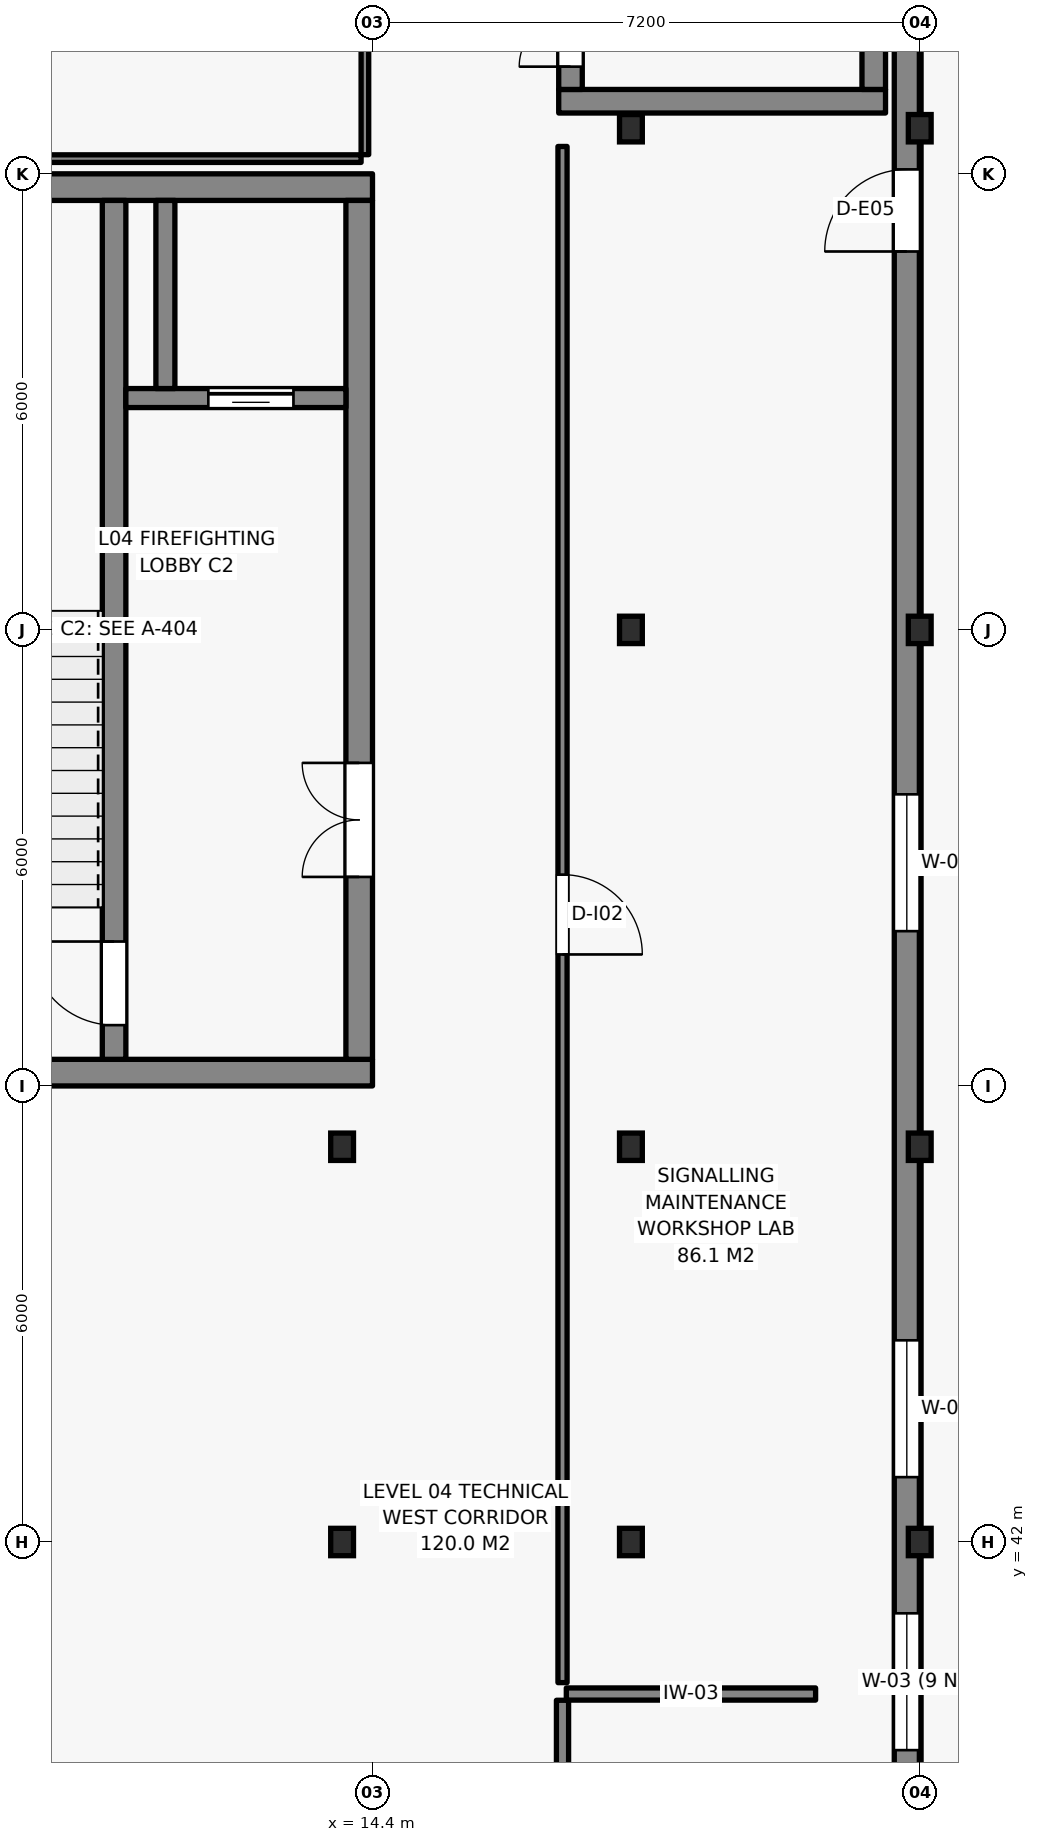
"""IFC4 building model, lengths in metres.
Left out: names, types, materials, properties, quantities, classifications, styles, units other than length and angle.
Written with IfcOpenShell. Run it as: python <this file> out.ifc"""

import sys

from ifc_helpers import new_model, si_unit, direction, frame, frame_2d, origin, origin_2d, place, context, subcontext, project, spatial, rectangle, i_section, extrude, element, fill, save


model = new_model("IFC4")
c1 = context("Model", 3, precision=1e-05, world=origin(), true_north=direction((0.0, 1.0)))
c2 = subcontext(c1, "Body", "Model", "MODEL_VIEW")
j1 = project(units=[si_unit("LENGTHUNIT", "METRE"), si_unit("PLANEANGLEUNIT", "RADIAN")], contexts=[c1])
p1 = place(None, origin())
s1 = spatial("IfcSite", under=j1, at=p1, CompositionType="ELEMENT")
p2 = place(p1, origin())
s2 = spatial("IfcBuilding", under=s1, at=p2, CompositionType="ELEMENT")
p3 = place(p2, frame((0.0, 0.0, 14.7)))
s3 = spatial("IfcBuildingStorey", under=s2, at=p3, CompositionType="ELEMENT", Elevation=14.7)
for number, where, z_axis, x_axis in (
    (1, (7.2, 48.175, 0.0), (0.0, 0.0, 1.0), (1.0, 0.0, 0.0)),
    (2, (7.2, 59.825, 0.0), (0.0, 0.0, 1.0), (1.0, 0.0, 0.0)),
):
    element("IfcWall", number, at=place(p3, frame(where, z_axis=z_axis, x_axis=x_axis)), inside=s3, PredefinedType="SHEAR", context=c2, shape_type="SweptSolid", body=[
        extrude(rectangle(XDim=7.2, YDim=0.35, at=frame_2d((3.6, 0.0))), origin(), (0.0, 0.0, 1.0), 3.8),
    ])
p4 = place(p3, frame((14.225, 48.35, 0.0), z_axis=(0.0, 0.0, 1.0), x_axis=(0.0, 1.0, 0.0)))
e3 = element("IfcWall", 3, at=p4, inside=s3, PredefinedType="SHEAR", context=c2, shape_type="SweptSolid", body=[
    extrude(rectangle(XDim=11.3, YDim=0.35, at=frame_2d((5.65, 0.0))), origin(), (0.0, 0.0, 1.0), 3.8),
])
p5 = place(p4, frame((2.4, 0.0, 0.0)))
e4 = element("IfcOpeningElement", 4, at=p5, cuts=e3, PredefinedType="OPENING", context=c2, shape_type="SweptSolid", body=[
    extrude(rectangle(XDim=1.5, YDim=2.15, at=frame_2d((0.75, 1.075))), frame((0.0, 0.185, 0.0), z_axis=(0.0, -1.0, 0.0), x_axis=(1.0, 0.0, 0.0)), (0.0, 0.0, 1.0), 0.37),
])
p6 = place(p3, frame((11.0, 48.35, 0.0), z_axis=(0.0, 0.0, 1.0), x_axis=(0.0, 1.0, 0.0)))
e5 = element("IfcWall", 5, at=p6, inside=s3, PredefinedType="SHEAR", context=c2, shape_type="SweptSolid", body=[
    extrude(rectangle(XDim=11.3, YDim=0.31, at=frame_2d((5.65, 0.0))), origin(), (0.0, 0.0, 1.0), 3.8),
])
p7 = place(p6, frame((0.45, 0.0, 0.0)))
e6 = element("IfcOpeningElement", 6, at=p7, cuts=e5, PredefinedType="OPENING", context=c2, shape_type="SweptSolid", body=[
    extrude(rectangle(XDim=1.1, YDim=2.15, at=frame_2d((0.55, 1.075))), frame((0.0, 0.165, 0.0), z_axis=(0.0, -1.0, 0.0), x_axis=(1.0, 0.0, 0.0)), (0.0, 0.0, 1.0), 0.33),
])
p8 = place(p3, frame((16.85, 60.955, 0.0), z_axis=(0.0, 0.0, 1.0), x_axis=(1.0, 0.0, 0.0)))
e7 = element("IfcWall", 7, at=p8, inside=s3, PredefinedType="SHEAR", context=c2, shape_type="SweptSolid", body=[
    extrude(rectangle(XDim=4.3, YDim=0.31, at=frame_2d((2.15, 0.0))), origin(), (0.0, 0.0, 1.0), 3.8),
])
p9 = place(p3, frame((17.005, 61.11, 0.0), z_axis=(0.0, 0.0, 1.0), x_axis=(0.0, 1.0, 0.0)))
e8 = element("IfcWall", 8, at=p9, inside=s3, PredefinedType="SHEAR", context=c2, shape_type="SweptSolid", body=[
    extrude(rectangle(XDim=9.58, YDim=0.31, at=frame_2d((4.79, 0.0))), origin(), (0.0, 0.0, 1.0), 3.8),
])
p10 = place(p9, frame((0.3, 0.0, 0.0)))
e9 = element("IfcOpeningElement", 9, at=p10, cuts=e8, PredefinedType="OPENING", context=c2, shape_type="SweptSolid", body=[
    extrude(rectangle(XDim=1.35, YDim=2.15, at=frame_2d((0.675, 1.075))), frame((0.0, 0.165, 0.0), z_axis=(0.0, -1.0, 0.0), x_axis=(1.0, 0.0, 0.0)), (0.0, 0.0, 1.0), 0.33),
])
p11 = place(p3, frame((20.995, 61.11, 0.0), z_axis=(0.0, 0.0, 1.0), x_axis=(0.0, 1.0, 0.0)))
e10 = element("IfcWall", 10, at=p11, inside=s3, PredefinedType="SHEAR", context=c2, shape_type="SweptSolid", body=[
    extrude(rectangle(XDim=9.58, YDim=0.31, at=frame_2d((4.79, 0.0))), origin(), (0.0, 0.0, 1.0), 3.8),
])
for number, where, z_axis, x_axis in (
    (11, (14.0, 42.0, 0.0), (0.0, 0.0, 1.0), (1.0, 0.0, 0.0)),
    (12, (14.0, 47.2, 0.0), (0.0, 0.0, 1.0), (1.0, 0.0, 0.0)),
    (13, (17.8, 42.0, 0.0), (0.0, 0.0, 1.0), (1.0, 0.0, 0.0)),
    (14, (17.8, 47.2, 0.0), (0.0, 0.0, 1.0), (1.0, 0.0, 0.0)),
    (15, (17.8, 54.0, 0.0), (0.0, 0.0, 1.0), (1.0, 0.0, 0.0)),
    (16, (17.8, 60.6, 0.0), (0.0, 0.0, 1.0), (1.0, 0.0, 0.0)),
    (17, (21.6, 42.0, 0.0), (0.0, 0.0, 1.0), (1.0, 0.0, 0.0)),
    (18, (21.6, 47.2, 0.0), (0.0, 0.0, 1.0), (1.0, 0.0, 0.0)),
    (19, (21.6, 54.0, 0.0), (0.0, 0.0, 1.0), (1.0, 0.0, 0.0)),
    (20, (21.6, 60.6, 0.0), (0.0, 0.0, 1.0), (1.0, 0.0, 0.0)),
):
    element("IfcColumn", number, at=place(p3, frame(where, z_axis=z_axis, x_axis=x_axis)), inside=s3, PredefinedType="COLUMN", context=c2, shape_type="SweptSolid", body=[
        extrude(i_section(OverallWidth=0.3, OverallDepth=0.36, WebThickness=0.012, FlangeThickness=0.022, FilletRadius=0.027, at=origin_2d()), origin(), (0.0, 0.0, 1.0), 4.05),
    ])
p12 = place(p3, frame((21.43, 24.0, 0.0), z_axis=(0.0, 0.0, 1.0), x_axis=(0.0, 1.0, 0.0)))
e21 = element("IfcWall", 21, at=p12, inside=s3, PredefinedType="SOLIDWALL", context=c2, shape_type="SweptSolid", body=[
    extrude(rectangle(XDim=46.69, YDim=0.33, at=frame_2d((23.345, 0.0))), origin(), (0.0, 0.0, 1.0), 3.415),
])
p13 = place(p12, frame((9.381, 0.0, 0.0)))
e22 = element("IfcOpeningElement", 22, at=p13, cuts=e21, PredefinedType="OPENING", context=c2, shape_type="SweptSolid", body=[
    extrude(rectangle(XDim=1.85, YDim=2.25, at=frame_2d((0.925, 1.125))), frame((0.0, 0.175, 0.0), z_axis=(0.0, -1.0, 0.0), x_axis=(1.0, 0.0, 0.0)), (0.0, 0.0, 1.0), 0.35),
])
p14 = place(p12, frame((34.978, 0.0, 0.0)))
e23 = element("IfcOpeningElement", 23, at=p14, cuts=e21, PredefinedType="OPENING", context=c2, shape_type="SweptSolid", body=[
    extrude(rectangle(XDim=1.08, YDim=2.2, at=frame_2d((0.54, 1.1))), frame((0.0, 0.175, 0.0), z_axis=(0.0, -1.0, 0.0), x_axis=(1.0, 0.0, 0.0)), (0.0, 0.0, 1.0), 0.35),
])
p15 = place(p12, frame((15.262, 0.0, 0.82)))
e24 = element("IfcOpeningElement", 24, at=p15, cuts=e21, PredefinedType="OPENING", context=c2, shape_type="SweptSolid", body=[
    extrude(rectangle(XDim=1.8, YDim=2.35, at=frame_2d((0.9, 1.175))), frame((0.0, 0.175, 0.0), z_axis=(0.0, -1.0, 0.0), x_axis=(1.0, 0.0, 0.0)), (0.0, 0.0, 1.0), 0.35),
])
p16 = place(p12, frame((18.854, 0.0, 0.82)))
e25 = element("IfcOpeningElement", 25, at=p16, cuts=e21, PredefinedType="OPENING", context=c2, shape_type="SweptSolid", body=[
    extrude(rectangle(XDim=1.8, YDim=2.35, at=frame_2d((0.9, 1.175))), frame((0.0, 0.175, 0.0), z_axis=(0.0, -1.0, 0.0), x_axis=(1.0, 0.0, 0.0)), (0.0, 0.0, 1.0), 0.35),
])
p17 = place(p12, frame((26.037, 0.0, 0.82)))
e26 = element("IfcOpeningElement", 26, at=p17, cuts=e21, PredefinedType="OPENING", context=c2, shape_type="SweptSolid", body=[
    extrude(rectangle(XDim=1.8, YDim=2.35, at=frame_2d((0.9, 1.175))), frame((0.0, 0.175, 0.0), z_axis=(0.0, -1.0, 0.0), x_axis=(1.0, 0.0, 0.0)), (0.0, 0.0, 1.0), 0.35),
])
p18 = place(p12, frame((43.994, 0.0, 0.82)))
e27 = element("IfcOpeningElement", 27, at=p18, cuts=e21, PredefinedType="OPENING", context=c2, shape_type="SweptSolid", body=[
    extrude(rectangle(XDim=1.8, YDim=2.35, at=frame_2d((0.9, 1.175))), frame((0.0, 0.175, 0.0), z_axis=(0.0, -1.0, 0.0), x_axis=(1.0, 0.0, 0.0)), (0.0, 0.0, 1.0), 0.35),
])
p19 = place(p3, frame((11.155, 57.05, 0.0), z_axis=(0.0, 0.0, 1.0), x_axis=(1.0, 0.0, 0.0)))
e28 = element("IfcWall", 28, at=p19, inside=s3, PredefinedType="SHEAR", context=c2, shape_type="SweptSolid", body=[
    extrude(rectangle(XDim=2.895, YDim=0.25, at=frame_2d((1.448, 0.0))), origin(), (0.0, 0.0, 1.0), 3.8),
])
p20 = place(p19, frame((1.085, 0.0, 0.0)))
e29 = element("IfcOpeningElement", 29, at=p20, cuts=e28, PredefinedType="OPENING", context=c2, shape_type="SweptSolid", body=[
    extrude(rectangle(XDim=1.12, YDim=2.15, at=frame_2d((0.56, 1.075))), frame((0.0, 0.135, 0.0), z_axis=(0.0, -1.0, 0.0), x_axis=(1.0, 0.0, 0.0)), (0.0, 0.0, 1.0), 0.27),
])
p21 = place(p3, frame((11.675, 57.175, 0.0), z_axis=(0.0, 0.0, 1.0), x_axis=(0.0, 1.0, 0.0)))
e30 = element("IfcWall", 30, at=p21, inside=s3, PredefinedType="SHEAR", context=c2, shape_type="SweptSolid", body=[
    extrude(rectangle(XDim=2.475, YDim=0.25, at=frame_2d((1.237, 0.0))), origin(), (0.0, 0.0, 1.0), 3.8),
])
p22 = place(p3, frame((20.23, 40.0, 0.0), z_axis=(0.0, 0.0, 1.0), x_axis=(-1.0, 0.0, 0.0)))
e31 = element("IfcWall", 31, at=p22, inside=s3, PredefinedType="PARTITIONING", context=c2, shape_type="SweptSolid", body=[
    extrude(rectangle(XDim=3.28, YDim=0.16, at=frame_2d((1.64, 0.0))), origin(), (0.0, 0.0, 1.0), 3.435),
])
p23 = place(p3, frame((16.9, 39.918, 0.0), z_axis=(0.0, 0.0, 1.0), x_axis=(0.0, -1.0, 0.0)))
e32 = element("IfcWall", 32, at=p23, inside=s3, PredefinedType="PARTITIONING", context=c2, shape_type="SweptSolid", body=[
    extrude(rectangle(XDim=19.186, YDim=0.16, at=frame_2d((9.593, 0.0))), origin(), (0.0, 0.0, 1.0), 3.575),
])
p24 = place(p3, frame((16.9, 60.36, 0.0), z_axis=(0.0, 0.0, 1.0), x_axis=(0.0, -1.0, 0.0)))
e33 = element("IfcWall", 33, at=p24, inside=s3, PredefinedType="PARTITIONING", context=c2, shape_type="SweptSolid", body=[
    extrude(rectangle(XDim=20.21, YDim=0.12, at=frame_2d((10.105, 0.0))), origin(), (0.0, 0.0, 1.0), 3.575),
])
p25 = place(p24, frame((9.58, 0.0, 0.0)))
e34 = element("IfcOpeningElement", 34, at=p25, cuts=e33, PredefinedType="OPENING", context=c2, shape_type="SweptSolid", body=[
    extrude(rectangle(XDim=1.05, YDim=2.15, at=frame_2d((0.525, 1.075))), frame((0.0, 0.07, 0.0), z_axis=(0.0, -1.0, 0.0), x_axis=(1.0, 0.0, 0.0)), (0.0, 0.0, 1.0), 0.14),
])
p26 = place(p3, frame((5.01, 60.2, 0.0), z_axis=(0.0, 0.0, 1.0), x_axis=(1.0, 0.0, 0.0)))
e35 = element("IfcWall", 35, at=p26, inside=s3, PredefinedType="MOVABLE", context=c2, shape_type="SweptSolid", body=[
    extrude(rectangle(XDim=9.24, YDim=0.1, at=frame_2d((4.62, 0.0))), origin(), (0.0, 0.0, 1.0), 3.415),
])
p27 = place(p3, frame((14.3, 60.252, 0.0), z_axis=(0.0, 0.0, 1.0), x_axis=(0.0, 1.0, 0.0)))
e36 = element("IfcWall", 36, at=p27, inside=s3, PredefinedType="MOVABLE", context=c2, shape_type="SweptSolid", body=[
    extrude(rectangle(XDim=10.798, YDim=0.1, at=frame_2d((5.399, 0.0))), origin(), (0.0, 0.0, 1.0), 3.76),
])
p28 = place(p27, frame((4.699, 0.0, 0.0)))
e37 = element("IfcOpeningElement", 37, at=p28, cuts=e36, PredefinedType="OPENING", context=c2, shape_type="SweptSolid", body=[
    extrude(rectangle(XDim=1.4, YDim=2.2, at=frame_2d((0.7, 1.1))), frame((0.0, 0.06, 0.0), z_axis=(0.0, -1.0, 0.0), x_axis=(1.0, 0.0, 0.0)), (0.0, 0.0, 1.0), 0.12),
])
p29 = place(p14, origin())
e38 = element("IfcDoor", 38, at=p29, inside=s3, OperationType="SINGLE_SWING_LEFT", PredefinedType="DOOR", context=c2, shape_type="SweptSolid", body=[
    extrude(rectangle(XDim=1.08, YDim=2.2, at=frame_2d((0.54, 1.1))), frame((0.0, 0.025, 0.0), z_axis=(0.0, -1.0, 0.0), x_axis=(1.0, 0.0, 0.0)), (0.0, 0.0, 1.0), 0.05),
])
fill(e23, e38)
p30 = place(p15, origin())
e39 = element("IfcWindow", 39, at=p30, inside=s3, PartitioningType="SINGLE_PANEL", PredefinedType="WINDOW", context=c2, shape_type="SweptSolid", body=[
    extrude(rectangle(XDim=1.8, YDim=2.35, at=frame_2d((0.9, 1.175))), frame((0.0, 0.03, 0.0), z_axis=(0.0, -1.0, 0.0), x_axis=(1.0, 0.0, 0.0)), (0.0, 0.0, 1.0), 0.06),
])
fill(e24, e39)
p31 = place(p16, origin())
e40 = element("IfcWindow", 40, at=p31, inside=s3, PartitioningType="SINGLE_PANEL", PredefinedType="WINDOW", context=c2, shape_type="SweptSolid", body=[
    extrude(rectangle(XDim=1.8, YDim=2.35, at=frame_2d((0.9, 1.175))), frame((0.0, 0.03, 0.0), z_axis=(0.0, -1.0, 0.0), x_axis=(1.0, 0.0, 0.0)), (0.0, 0.0, 1.0), 0.06),
])
fill(e25, e40)
p32 = place(p17, origin())
e41 = element("IfcWindow", 41, at=p32, inside=s3, PartitioningType="SINGLE_PANEL", PredefinedType="WINDOW", context=c2, shape_type="SweptSolid", body=[
    extrude(rectangle(XDim=1.8, YDim=2.35, at=frame_2d((0.9, 1.175))), frame((0.0, 0.03, 0.0), z_axis=(0.0, -1.0, 0.0), x_axis=(1.0, 0.0, 0.0)), (0.0, 0.0, 1.0), 0.06),
])
fill(e26, e41)
p33 = place(p20, origin())
e42 = element("IfcDoor", 42, at=p33, inside=s3, OperationType="SLIDING_TO_LEFT", PredefinedType="DOOR", context=c2, shape_type="SweptSolid", body=[
    extrude(rectangle(XDim=1.12, YDim=2.15, at=frame_2d((0.56, 1.075))), frame((0.0, 0.025, 0.0), z_axis=(0.0, -1.0, 0.0), x_axis=(1.0, 0.0, 0.0)), (0.0, 0.0, 1.0), 0.05),
])
fill(e29, e42)
p34 = place(p5, origin())
e43 = element("IfcDoor", 43, at=p34, inside=s3, OperationType="DOUBLE_DOOR_SINGLE_SWING", PredefinedType="DOOR", context=c2, shape_type="SweptSolid", body=[
    extrude(rectangle(XDim=1.5, YDim=2.15, at=frame_2d((0.75, 1.075))), frame((0.0, 0.025, 0.0), z_axis=(0.0, -1.0, 0.0), x_axis=(1.0, 0.0, 0.0)), (0.0, 0.0, 1.0), 0.05),
])
fill(e4, e43)
p35 = place(p7, origin())
e44 = element("IfcDoor", 44, at=p35, inside=s3, OperationType="SINGLE_SWING_RIGHT", PredefinedType="DOOR", context=c2, shape_type="SweptSolid", body=[
    extrude(rectangle(XDim=1.1, YDim=2.15, at=frame_2d((0.55, 1.075))), frame((0.0, 0.025, 0.0), z_axis=(0.0, -1.0, 0.0), x_axis=(1.0, 0.0, 0.0)), (0.0, 0.0, 1.0), 0.05),
])
fill(e6, e44)
p36 = place(p10, origin())
e45 = element("IfcDoor", 45, at=p36, inside=s3, OperationType="DOUBLE_DOOR_SINGLE_SWING", PredefinedType="DOOR", context=c2, shape_type="SweptSolid", body=[
    extrude(rectangle(XDim=1.35, YDim=2.15, at=frame_2d((0.675, 1.075))), frame((0.0, 0.025, 0.0), z_axis=(0.0, -1.0, 0.0), x_axis=(1.0, 0.0, 0.0)), (0.0, 0.0, 1.0), 0.05),
])
fill(e9, e45)
p37 = place(p25, origin())
e46 = element("IfcDoor", 46, at=p37, inside=s3, OperationType="SINGLE_SWING_RIGHT", PredefinedType="DOOR", context=c2, shape_type="SweptSolid", body=[
    extrude(rectangle(XDim=1.05, YDim=2.15, at=frame_2d((0.525, 1.075))), frame((0.0, 0.025, 0.0), z_axis=(0.0, -1.0, 0.0), x_axis=(1.0, 0.0, 0.0)), (0.0, 0.0, 1.0), 0.05),
])
fill(e34, e46)
save(model, sys.argv[1])
